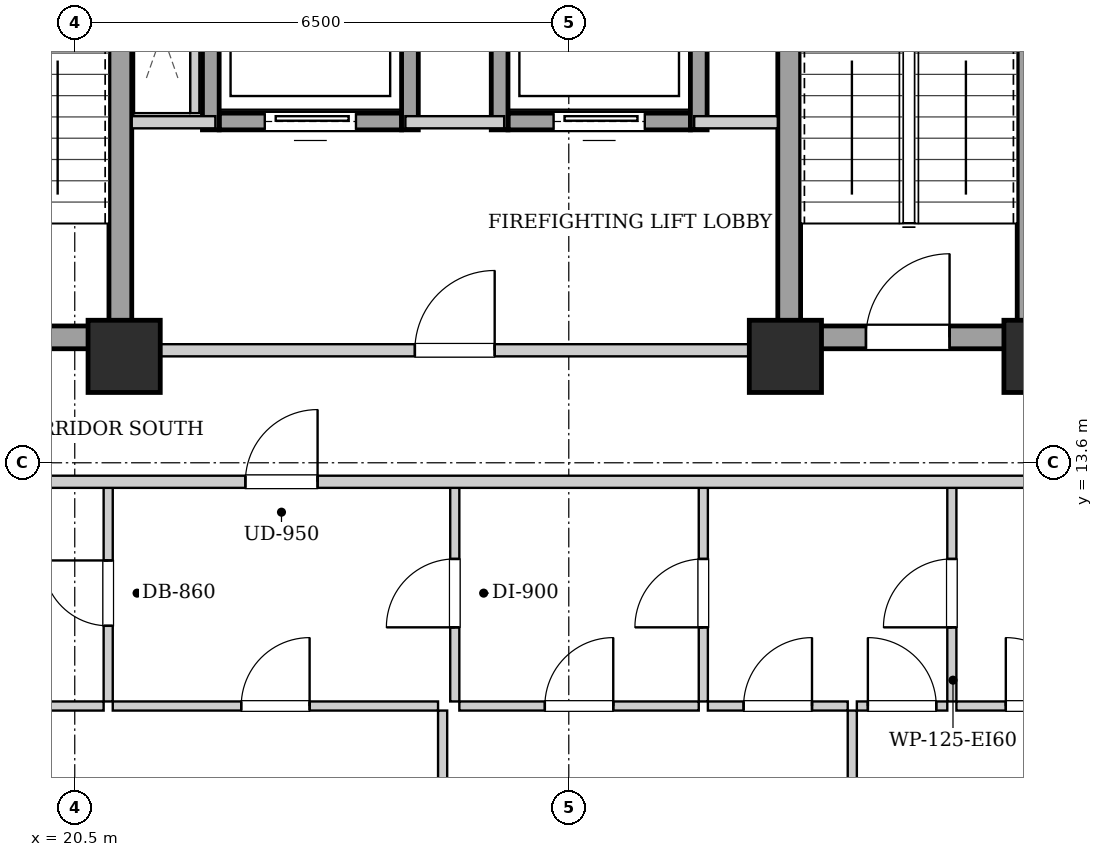
"""IFC4 building model, lengths in metres.
Left out: names, types, materials, properties, quantities, classifications, styles, units other than length and angle.
Written with IfcOpenShell. Run it as: python <this file> out.ifc"""

import sys

from ifc_helpers import new_model, si_unit, direction, frame, frame_2d, origin, origin_2d, place, context, subcontext, project, spatial, rectangle, extrude, element, fill, save


model = new_model("IFC4")
c1 = context("Model", 3, precision=1e-05, world=origin(), true_north=direction((0.0, 1.0)))
c2 = subcontext(c1, "Body", "Model", "MODEL_VIEW")
j1 = project(units=[si_unit("LENGTHUNIT", "METRE"), si_unit("PLANEANGLEUNIT", "RADIAN")], contexts=[c1])
p1 = place(None, origin())
s1 = spatial("IfcSite", under=j1, at=p1, CompositionType="ELEMENT")
p2 = place(p1, origin())
s2 = spatial("IfcBuilding", under=s1, at=p2, CompositionType="ELEMENT")
p3 = place(p2, frame((0.0, 0.0, 166.65)))
s3 = spatial("IfcBuildingStorey", under=s2, at=p3, CompositionType="ELEMENT", Elevation=166.65)
for number, where, z_axis, x_axis in (
    (1, (21.15, 15.0, 0.0), (0.0, 0.0, 1.0), (1.0, 0.0, 0.0)),
    (2, (29.85, 15.0, 0.0), (0.0, 0.0, 1.0), (1.0, 0.0, 0.0)),
    (3, (33.2, 15.0, 0.0), (0.0, 0.0, 1.0), (1.0, 0.0, 0.0)),
):
    element("IfcColumn", number, at=place(p3, frame(where, z_axis=z_axis, x_axis=x_axis)), inside=s3, PredefinedType="COLUMN", context=c2, shape_type="SweptSolid", body=[
        extrude(rectangle(XDim=0.95, YDim=0.95, at=origin_2d()), origin(), (0.0, 0.0, 1.0), 3.25),
    ])
p4 = place(p3, frame((21.1, 15.1, 0.0), z_axis=(0.0, 0.0, 1.0), x_axis=(0.0, 1.0, 0.0)))
e4 = element("IfcWall", 4, at=p4, inside=s3, PredefinedType="SHEAR", context=c2, shape_type="SweptSolid", body=[
    extrude(rectangle(XDim=9.0, YDim=0.3, at=frame_2d((4.5, 0.0))), origin(), (0.0, 0.0, 1.0), 2.93),
])
p5 = place(p3, frame((18.1, 15.25, 0.0), z_axis=(0.0, 0.0, 1.0), x_axis=(1.0, 0.0, 0.0)))
e5 = element("IfcWall", 5, at=p5, inside=s3, PredefinedType="SHEAR", context=c2, shape_type="SweptSolid", body=[
    extrude(rectangle(XDim=2.85, YDim=0.3, at=frame_2d((1.425, 0.0))), origin(), (0.0, 0.0, 1.0), 2.93),
])
p6 = place(p5, frame((0.86, 0.0, 0.0)))
e6 = element("IfcOpeningElement", 6, at=p6, cuts=e5, PredefinedType="OPENING", context=c2, shape_type="SweptSolid", body=[
    extrude(rectangle(XDim=1.1, YDim=2.05, at=frame_2d((0.55, 1.025))), frame((0.0, 0.16, 0.0), z_axis=(0.0, -1.0, 0.0), x_axis=(1.0, 0.0, 0.0)), (0.0, 0.0, 1.0), 0.32),
])
for number, where, z_axis, x_axis in (
    (7, (29.9, 15.1, 0.0), (0.0, 0.0, 1.0), (0.0, 1.0, 0.0)),
    (8, (33.05, 15.1, 0.0), (0.0, 0.0, 1.0), (0.0, 1.0, 0.0)),
):
    element("IfcWall", number, at=place(p3, frame(where, z_axis=z_axis, x_axis=x_axis)), inside=s3, PredefinedType="SHEAR", context=c2, shape_type="SweptSolid", body=[
        extrude(rectangle(XDim=9.0, YDim=0.3, at=frame_2d((4.5, 0.0))), origin(), (0.0, 0.0, 1.0), 2.93),
    ])
p7 = place(p3, frame((30.05, 15.25, 0.0), z_axis=(0.0, 0.0, 1.0), x_axis=(1.0, 0.0, 0.0)))
e9 = element("IfcWall", 9, at=p7, inside=s3, PredefinedType="SHEAR", context=c2, shape_type="SweptSolid", body=[
    extrude(rectangle(XDim=2.85, YDim=0.3, at=frame_2d((1.425, 0.0))), origin(), (0.0, 0.0, 1.0), 2.93),
])
p8 = place(p7, frame((0.86, 0.0, 0.0)))
e10 = element("IfcOpeningElement", 10, at=p8, cuts=e9, PredefinedType="OPENING", context=c2, shape_type="SweptSolid", body=[
    extrude(rectangle(XDim=1.1, YDim=2.05, at=frame_2d((0.55, 1.025))), frame((0.0, 0.16, 0.0), z_axis=(0.0, -1.0, 0.0), x_axis=(1.0, 0.0, 0.0)), (0.0, 0.0, 1.0), 0.32),
])
p9 = place(p3, frame((22.4, 18.09, 0.0), z_axis=(0.0, 0.0, 1.0), x_axis=(1.0, 0.0, 0.0)))
e11 = element("IfcWall", 11, at=p9, inside=s3, PredefinedType="SHEAR", context=c2, shape_type="SweptSolid", body=[
    extrude(rectangle(XDim=2.4, YDim=0.22, at=frame_2d((1.2, 0.0))), origin(), (0.0, 0.0, 1.0), 2.93),
])
p10 = place(p9, frame((0.6, 0.0, 0.0)))
e12 = element("IfcOpeningElement", 12, at=p10, cuts=e11, PredefinedType="OPENING", context=c2, shape_type="SweptSolid", body=[
    extrude(rectangle(XDim=1.2, YDim=2.15, at=frame_2d((0.6, 1.075))), frame((0.0, 0.12, 0.0), z_axis=(0.0, -1.0, 0.0), x_axis=(1.0, 0.0, 0.0)), (0.0, 0.0, 1.0), 0.24),
])
for number, where, z_axis, x_axis in (
    (13, (22.29, 17.98, 0.0), (0.0, 0.0, 1.0), (0.0, 1.0, 0.0)),
    (14, (24.91, 17.98, 0.0), (0.0, 0.0, 1.0), (0.0, 1.0, 0.0)),
):
    element("IfcWall", number, at=place(p3, frame(where, z_axis=z_axis, x_axis=x_axis)), inside=s3, PredefinedType="SHEAR", context=c2, shape_type="SweptSolid", body=[
        extrude(rectangle(XDim=2.54, YDim=0.22, at=frame_2d((1.27, 0.0))), origin(), (0.0, 0.0, 1.0), 2.93),
    ])
p11 = place(p3, frame((26.2, 18.09, 0.0), z_axis=(0.0, 0.0, 1.0), x_axis=(1.0, 0.0, 0.0)))
e15 = element("IfcWall", 15, at=p11, inside=s3, PredefinedType="SHEAR", context=c2, shape_type="SweptSolid", body=[
    extrude(rectangle(XDim=2.4, YDim=0.22, at=frame_2d((1.2, 0.0))), origin(), (0.0, 0.0, 1.0), 2.93),
])
p12 = place(p11, frame((0.6, 0.0, 0.0)))
e16 = element("IfcOpeningElement", 16, at=p12, cuts=e15, PredefinedType="OPENING", context=c2, shape_type="SweptSolid", body=[
    extrude(rectangle(XDim=1.2, YDim=2.15, at=frame_2d((0.6, 1.075))), frame((0.0, 0.12, 0.0), z_axis=(0.0, -1.0, 0.0), x_axis=(1.0, 0.0, 0.0)), (0.0, 0.0, 1.0), 0.24),
])
for number, where, z_axis, x_axis in (
    (17, (26.09, 17.98, 0.0), (0.0, 0.0, 1.0), (0.0, 1.0, 0.0)),
    (18, (28.71, 17.98, 0.0), (0.0, 0.0, 1.0), (0.0, 1.0, 0.0)),
):
    element("IfcWall", number, at=place(p3, frame(where, z_axis=z_axis, x_axis=x_axis)), inside=s3, PredefinedType="SHEAR", context=c2, shape_type="SweptSolid", body=[
        extrude(rectangle(XDim=2.54, YDim=0.22, at=frame_2d((1.27, 0.0))), origin(), (0.0, 0.0, 1.0), 2.93),
    ])
p13 = place(p3, frame((21.25, 15.08, 0.0), z_axis=(0.0, 0.0, 1.0), x_axis=(1.0, 0.0, 0.0)))
e19 = element("IfcWall", 19, at=p13, inside=s3, PredefinedType="PARTITIONING", context=c2, shape_type="SweptSolid", body=[
    extrude(rectangle(XDim=8.5, YDim=0.16, at=frame_2d((4.25, 0.0))), origin(), (0.0, 0.0, 1.0), 2.382),
])
p14 = place(p13, frame((3.725, 0.0, 0.0)))
e20 = element("IfcOpeningElement", 20, at=p14, cuts=e19, PredefinedType="OPENING", context=c2, shape_type="SweptSolid", body=[
    extrude(rectangle(XDim=1.05, YDim=2.05, at=frame_2d((0.525, 1.025))), frame((0.0, 0.09, 0.0), z_axis=(0.0, -1.0, 0.0), x_axis=(1.0, 0.0, 0.0)), (0.0, 0.0, 1.0), 0.18),
])
p15 = place(p3, frame((21.25, 18.08, 0.0), z_axis=(0.0, 0.0, 1.0), x_axis=(1.0, 0.0, 0.0)))
e21 = element("IfcWall", 21, at=p15, inside=s3, PredefinedType="PARTITIONING", context=c2, shape_type="SweptSolid", body=[
    extrude(rectangle(XDim=1.1, YDim=0.16, at=frame_2d((0.55, 0.0))), origin(), (0.0, 0.0, 1.0), 2.93),
])
p16 = place(p3, frame((24.85, 18.08, 0.0), z_axis=(0.0, 0.0, 1.0), x_axis=(1.0, 0.0, 0.0)))
e22 = element("IfcWall", 22, at=p16, inside=s3, PredefinedType="PARTITIONING", context=c2, shape_type="SweptSolid", body=[
    extrude(rectangle(XDim=1.3, YDim=0.16, at=frame_2d((0.65, 0.0))), origin(), (0.0, 0.0, 1.0), 2.93),
])
p17 = place(p3, frame((28.65, 18.08, 0.0), z_axis=(0.0, 0.0, 1.0), x_axis=(1.0, 0.0, 0.0)))
e23 = element("IfcWall", 23, at=p17, inside=s3, PredefinedType="PARTITIONING", context=c2, shape_type="SweptSolid", body=[
    extrude(rectangle(XDim=1.1, YDim=0.16, at=frame_2d((0.55, 0.0))), origin(), (0.0, 0.0, 1.0), 2.93),
])
p18 = place(p3, frame((22.08, 18.2, 0.0), z_axis=(0.0, 0.0, 1.0), x_axis=(0.0, 1.0, 0.0)))
e24 = element("IfcWall", 24, at=p18, inside=s3, PredefinedType="PARTITIONING", context=c2, shape_type="SweptSolid", body=[
    extrude(rectangle(XDim=2.12, YDim=0.12, at=frame_2d((1.06, 0.0))), origin(), (0.0, 0.0, 1.0), 2.93),
])
p19 = place(p3, frame((20.94, 10.46, 0.0), z_axis=(0.0, 0.0, 1.0), x_axis=(0.0, 1.0, 0.0)))
e25 = element("IfcWall", 25, at=p19, inside=s3, PredefinedType="PARTITIONING", context=c2, shape_type="SweptSolid", body=[
    extrude(rectangle(XDim=2.85, YDim=0.12, at=frame_2d((1.425, 0.0))), origin(), (0.0, 0.0, 1.0), 2.93),
])
p20 = place(p19, frame((0.995, 0.0, 0.0)))
e26 = element("IfcOpeningElement", 26, at=p20, cuts=e25, PredefinedType="OPENING", context=c2, shape_type="SweptSolid", body=[
    extrude(rectangle(XDim=0.86, YDim=2.05, at=frame_2d((0.43, 1.025))), frame((0.0, 0.07, 0.0), z_axis=(0.0, -1.0, 0.0), x_axis=(1.0, 0.0, 0.0)), (0.0, 0.0, 1.0), 0.14),
])
p21 = place(p3, frame((18.48, 10.4, 0.0), z_axis=(0.0, 0.0, 1.0), x_axis=(1.0, 0.0, 0.0)))
e27 = element("IfcWall", 27, at=p21, inside=s3, PredefinedType="PARTITIONING", context=c2, shape_type="SweptSolid", body=[
    extrude(rectangle(XDim=2.4, YDim=0.12, at=frame_2d((1.2, 0.0))), origin(), (0.0, 0.0, 1.0), 2.93),
])
p22 = place(p3, frame((25.5, 10.46, 0.0), z_axis=(0.0, 0.0, 1.0), x_axis=(0.0, 1.0, 0.0)))
e28 = element("IfcWall", 28, at=p22, inside=s3, PredefinedType="PARTITIONING", context=c2, shape_type="SweptSolid", body=[
    extrude(rectangle(XDim=2.85, YDim=0.12, at=frame_2d((1.425, 0.0))), origin(), (0.0, 0.0, 1.0), 2.93),
])
p23 = place(p22, frame((0.975, 0.0, 0.0)))
e29 = element("IfcOpeningElement", 29, at=p23, cuts=e28, PredefinedType="OPENING", context=c2, shape_type="SweptSolid", body=[
    extrude(rectangle(XDim=0.9, YDim=2.05, at=frame_2d((0.45, 1.025))), frame((0.0, 0.07, 0.0), z_axis=(0.0, -1.0, 0.0), x_axis=(1.0, 0.0, 0.0)), (0.0, 0.0, 1.0), 0.14),
])
p24 = place(p3, frame((21.0, 10.4, 0.0), z_axis=(0.0, 0.0, 1.0), x_axis=(1.0, 0.0, 0.0)))
e30 = element("IfcWall", 30, at=p24, inside=s3, PredefinedType="PARTITIONING", context=c2, shape_type="SweptSolid", body=[
    extrude(rectangle(XDim=4.28, YDim=0.12, at=frame_2d((2.14, 0.0))), origin(), (0.0, 0.0, 1.0), 2.93),
])
p25 = place(p24, frame((1.69, 0.0, 0.0)))
e31 = element("IfcOpeningElement", 31, at=p25, cuts=e30, PredefinedType="OPENING", context=c2, shape_type="SweptSolid", body=[
    extrude(rectangle(XDim=0.9, YDim=2.05, at=frame_2d((0.45, 1.025))), frame((0.0, 0.07, 0.0), z_axis=(0.0, -1.0, 0.0), x_axis=(1.0, 0.0, 0.0)), (0.0, 0.0, 1.0), 0.14),
])
p26 = place(p3, frame((28.77, 10.46, 0.0), z_axis=(0.0, 0.0, 1.0), x_axis=(0.0, 1.0, 0.0)))
e32 = element("IfcWall", 32, at=p26, inside=s3, PredefinedType="PARTITIONING", context=c2, shape_type="SweptSolid", body=[
    extrude(rectangle(XDim=2.85, YDim=0.12, at=frame_2d((1.425, 0.0))), origin(), (0.0, 0.0, 1.0), 2.93),
])
p27 = place(p26, frame((0.975, 0.0, 0.0)))
e33 = element("IfcOpeningElement", 33, at=p27, cuts=e32, PredefinedType="OPENING", context=c2, shape_type="SweptSolid", body=[
    extrude(rectangle(XDim=0.9, YDim=2.05, at=frame_2d((0.45, 1.025))), frame((0.0, 0.07, 0.0), z_axis=(0.0, -1.0, 0.0), x_axis=(1.0, 0.0, 0.0)), (0.0, 0.0, 1.0), 0.14),
])
p28 = place(p3, frame((25.56, 10.4, 0.0), z_axis=(0.0, 0.0, 1.0), x_axis=(1.0, 0.0, 0.0)))
e34 = element("IfcWall", 34, at=p28, inside=s3, PredefinedType="PARTITIONING", context=c2, shape_type="SweptSolid", body=[
    extrude(rectangle(XDim=3.15, YDim=0.12, at=frame_2d((1.575, 0.0))), origin(), (0.0, 0.0, 1.0), 2.93),
])
p29 = place(p28, frame((1.125, 0.0, 0.0)))
e35 = element("IfcOpeningElement", 35, at=p29, cuts=e34, PredefinedType="OPENING", context=c2, shape_type="SweptSolid", body=[
    extrude(rectangle(XDim=0.9, YDim=2.05, at=frame_2d((0.45, 1.025))), frame((0.0, 0.07, 0.0), z_axis=(0.0, -1.0, 0.0), x_axis=(1.0, 0.0, 0.0)), (0.0, 0.0, 1.0), 0.14),
])
p30 = place(p3, frame((32.04, 10.46, 0.0), z_axis=(0.0, 0.0, 1.0), x_axis=(0.0, 1.0, 0.0)))
e36 = element("IfcWall", 36, at=p30, inside=s3, PredefinedType="PARTITIONING", context=c2, shape_type="SweptSolid", body=[
    extrude(rectangle(XDim=2.85, YDim=0.12, at=frame_2d((1.425, 0.0))), origin(), (0.0, 0.0, 1.0), 2.93),
])
p31 = place(p30, frame((0.975, 0.0, 0.0)))
e37 = element("IfcOpeningElement", 37, at=p31, cuts=e36, PredefinedType="OPENING", context=c2, shape_type="SweptSolid", body=[
    extrude(rectangle(XDim=0.9, YDim=2.05, at=frame_2d((0.45, 1.025))), frame((0.0, 0.07, 0.0), z_axis=(0.0, -1.0, 0.0), x_axis=(1.0, 0.0, 0.0)), (0.0, 0.0, 1.0), 0.14),
])
p32 = place(p3, frame((28.83, 10.4, 0.0), z_axis=(0.0, 0.0, 1.0), x_axis=(1.0, 0.0, 0.0)))
e38 = element("IfcWall", 38, at=p32, inside=s3, PredefinedType="PARTITIONING", context=c2, shape_type="SweptSolid", body=[
    extrude(rectangle(XDim=1.84, YDim=0.12, at=frame_2d((0.92, 0.0))), origin(), (0.0, 0.0, 1.0), 2.93),
])
p33 = place(p32, frame((0.47, 0.0, 0.0)))
e39 = element("IfcOpeningElement", 39, at=p33, cuts=e38, PredefinedType="OPENING", context=c2, shape_type="SweptSolid", body=[
    extrude(rectangle(XDim=0.9, YDim=2.05, at=frame_2d((0.45, 1.025))), frame((0.0, 0.07, 0.0), z_axis=(0.0, -1.0, 0.0), x_axis=(1.0, 0.0, 0.0)), (0.0, 0.0, 1.0), 0.14),
])
p34 = place(p3, frame((30.79, 10.4, 0.0), z_axis=(0.0, 0.0, 1.0), x_axis=(1.0, 0.0, 0.0)))
e40 = element("IfcWall", 40, at=p34, inside=s3, PredefinedType="PARTITIONING", context=c2, shape_type="SweptSolid", body=[
    extrude(rectangle(XDim=1.19, YDim=0.12, at=frame_2d((0.595, 0.0))), origin(), (0.0, 0.0, 1.0), 2.93),
])
p35 = place(p34, frame((0.145, 0.0, 0.0)))
e41 = element("IfcOpeningElement", 41, at=p35, cuts=e40, PredefinedType="OPENING", context=c2, shape_type="SweptSolid", body=[
    extrude(rectangle(XDim=0.9, YDim=2.05, at=frame_2d((0.45, 1.025))), frame((0.0, 0.07, 0.0), z_axis=(0.0, -1.0, 0.0), x_axis=(1.0, 0.0, 0.0)), (0.0, 0.0, 1.0), 0.14),
])
p36 = place(p3, frame((32.1, 10.4, 0.0), z_axis=(0.0, 0.0, 1.0), x_axis=(1.0, 0.0, 0.0)))
e42 = element("IfcWall", 42, at=p36, inside=s3, PredefinedType="PARTITIONING", context=c2, shape_type="SweptSolid", body=[
    extrude(rectangle(XDim=2.2, YDim=0.12, at=frame_2d((1.1, 0.0))), origin(), (0.0, 0.0, 1.0), 2.93),
])
p37 = place(p36, frame((0.65, 0.0, 0.0)))
e43 = element("IfcOpeningElement", 43, at=p37, cuts=e42, PredefinedType="OPENING", context=c2, shape_type="SweptSolid", body=[
    extrude(rectangle(XDim=0.9, YDim=2.05, at=frame_2d((0.45, 1.025))), frame((0.0, 0.07, 0.0), z_axis=(0.0, -1.0, 0.0), x_axis=(1.0, 0.0, 0.0)), (0.0, 0.0, 1.0), 0.14),
])
p38 = place(p3, frame((25.34, 4.08, 0.0), z_axis=(0.0, 0.0, 1.0), x_axis=(0.0, 1.0, 0.0)))
e44 = element("IfcWall", 44, at=p38, inside=s3, PredefinedType="PARTITIONING", context=c2, shape_type="SweptSolid", body=[
    extrude(rectangle(XDim=6.26, YDim=0.12, at=frame_2d((3.13, 0.0))), origin(), (0.0, 0.0, 1.0), 2.93),
])
p39 = place(p38, frame((2.665, 0.0, 0.0)))
e45 = element("IfcOpeningElement", 45, at=p39, cuts=e44, PredefinedType="OPENING", context=c2, shape_type="SweptSolid", body=[
    extrude(rectangle(XDim=0.9, YDim=2.05, at=frame_2d((0.45, 1.025))), frame((0.0, 0.07, 0.0), z_axis=(0.0, -1.0, 0.0), x_axis=(1.0, 0.0, 0.0)), (0.0, 0.0, 1.0), 0.14),
])
p40 = place(p3, frame((30.73, 4.08, 0.0), z_axis=(0.0, 0.0, 1.0), x_axis=(0.0, 1.0, 0.0)))
e46 = element("IfcWall", 46, at=p40, inside=s3, PredefinedType="PARTITIONING", context=c2, shape_type="SweptSolid", body=[
    extrude(rectangle(XDim=6.26, YDim=0.12, at=frame_2d((3.13, 0.0))), origin(), (0.0, 0.0, 1.0), 2.93),
])
p41 = place(p40, frame((2.665, 0.0, 0.0)))
e47 = element("IfcOpeningElement", 47, at=p41, cuts=e46, PredefinedType="OPENING", context=c2, shape_type="SweptSolid", body=[
    extrude(rectangle(XDim=0.9, YDim=2.05, at=frame_2d((0.45, 1.025))), frame((0.0, 0.07, 0.0), z_axis=(0.0, -1.0, 0.0), x_axis=(1.0, 0.0, 0.0)), (0.0, 0.0, 1.0), 0.14),
])
p42 = place(p3, frame((10.05, 13.35, 0.0), z_axis=(0.0, 0.0, 1.0), x_axis=(1.0, 0.0, 0.0)))
e48 = element("IfcWall", 48, at=p42, inside=s3, PredefinedType="PARTITIONING", context=c2, shape_type="SweptSolid", body=[
    extrude(rectangle(XDim=27.7, YDim=0.16, at=frame_2d((13.85, 0.0))), origin(), (0.0, 0.0, 1.0), 2.93),
])
p43 = place(p42, frame((3.8, 0.0, 0.0)))
e49 = element("IfcOpeningElement", 49, at=p43, cuts=e48, PredefinedType="OPENING", context=c2, shape_type="SweptSolid", body=[
    extrude(rectangle(XDim=0.95, YDim=2.1, at=frame_2d((0.475, 1.05))), frame((0.0, 0.09, 0.0), z_axis=(0.0, -1.0, 0.0), x_axis=(1.0, 0.0, 0.0)), (0.0, 0.0, 1.0), 0.18),
])
p44 = place(p42, frame((12.695, 0.0, 0.0)))
e50 = element("IfcOpeningElement", 50, at=p44, cuts=e48, PredefinedType="OPENING", context=c2, shape_type="SweptSolid", body=[
    extrude(rectangle(XDim=0.95, YDim=2.1, at=frame_2d((0.475, 1.05))), frame((0.0, 0.09, 0.0), z_axis=(0.0, -1.0, 0.0), x_axis=(1.0, 0.0, 0.0)), (0.0, 0.0, 1.0), 0.18),
])
p45 = place(p8, origin())
e51 = element("IfcDoor", 51, at=p45, inside=s3, OperationType="SINGLE_SWING_RIGHT", PredefinedType="DOOR", context=c2, shape_type="SweptSolid", body=[
    extrude(rectangle(XDim=1.1, YDim=2.05, at=frame_2d((0.55, 1.025))), frame((0.0, 0.025, 0.0), z_axis=(0.0, -1.0, 0.0), x_axis=(1.0, 0.0, 0.0)), (0.0, 0.0, 1.0), 0.05),
])
fill(e10, e51)
p46 = place(p10, origin())
e52 = element("IfcDoor", 52, at=p46, inside=s3, OperationType="SLIDING_TO_LEFT", PredefinedType="DOOR", context=c2, shape_type="SweptSolid", body=[
    extrude(rectangle(XDim=1.2, YDim=2.15, at=frame_2d((0.6, 1.075))), frame((0.0, 0.025, 0.0), z_axis=(0.0, -1.0, 0.0), x_axis=(1.0, 0.0, 0.0)), (0.0, 0.0, 1.0), 0.05),
])
fill(e12, e52)
p47 = place(p12, origin())
e53 = element("IfcDoor", 53, at=p47, inside=s3, OperationType="SLIDING_TO_LEFT", PredefinedType="DOOR", context=c2, shape_type="SweptSolid", body=[
    extrude(rectangle(XDim=1.2, YDim=2.15, at=frame_2d((0.6, 1.075))), frame((0.0, 0.025, 0.0), z_axis=(0.0, -1.0, 0.0), x_axis=(1.0, 0.0, 0.0)), (0.0, 0.0, 1.0), 0.05),
])
fill(e16, e53)
p48 = place(p14, origin())
e54 = element("IfcDoor", 54, at=p48, inside=s3, OperationType="SINGLE_SWING_RIGHT", PredefinedType="DOOR", context=c2, shape_type="SweptSolid", body=[
    extrude(rectangle(XDim=1.05, YDim=2.05, at=frame_2d((0.525, 1.025))), frame((0.0, 0.025, 0.0), z_axis=(0.0, -1.0, 0.0), x_axis=(1.0, 0.0, 0.0)), (0.0, 0.0, 1.0), 0.05),
])
fill(e20, e54)
p49 = place(p20, origin())
e55 = element("IfcDoor", 55, at=p49, inside=s3, OperationType="SINGLE_SWING_RIGHT", PredefinedType="DOOR", context=c2, shape_type="SweptSolid", body=[
    extrude(rectangle(XDim=0.86, YDim=2.05, at=frame_2d((0.43, 1.025))), frame((0.0, 0.025, 0.0), z_axis=(0.0, -1.0, 0.0), x_axis=(1.0, 0.0, 0.0)), (0.0, 0.0, 1.0), 0.05),
])
fill(e26, e55)
p50 = place(p23, origin())
e56 = element("IfcDoor", 56, at=p50, inside=s3, OperationType="SINGLE_SWING_LEFT", PredefinedType="DOOR", context=c2, shape_type="SweptSolid", body=[
    extrude(rectangle(XDim=0.9, YDim=2.05, at=frame_2d((0.45, 1.025))), frame((0.0, 0.025, 0.0), z_axis=(0.0, -1.0, 0.0), x_axis=(1.0, 0.0, 0.0)), (0.0, 0.0, 1.0), 0.05),
])
fill(e29, e56)
p51 = place(p25, origin())
e57 = element("IfcDoor", 57, at=p51, inside=s3, OperationType="SINGLE_SWING_RIGHT", PredefinedType="DOOR", context=c2, shape_type="SweptSolid", body=[
    extrude(rectangle(XDim=0.9, YDim=2.05, at=frame_2d((0.45, 1.025))), frame((0.0, 0.025, 0.0), z_axis=(0.0, -1.0, 0.0), x_axis=(1.0, 0.0, 0.0)), (0.0, 0.0, 1.0), 0.05),
])
fill(e31, e57)
p52 = place(p27, origin())
e58 = element("IfcDoor", 58, at=p52, inside=s3, OperationType="SINGLE_SWING_LEFT", PredefinedType="DOOR", context=c2, shape_type="SweptSolid", body=[
    extrude(rectangle(XDim=0.9, YDim=2.05, at=frame_2d((0.45, 1.025))), frame((0.0, 0.025, 0.0), z_axis=(0.0, -1.0, 0.0), x_axis=(1.0, 0.0, 0.0)), (0.0, 0.0, 1.0), 0.05),
])
fill(e33, e58)
p53 = place(p29, origin())
e59 = element("IfcDoor", 59, at=p53, inside=s3, OperationType="SINGLE_SWING_RIGHT", PredefinedType="DOOR", context=c2, shape_type="SweptSolid", body=[
    extrude(rectangle(XDim=0.9, YDim=2.05, at=frame_2d((0.45, 1.025))), frame((0.0, 0.025, 0.0), z_axis=(0.0, -1.0, 0.0), x_axis=(1.0, 0.0, 0.0)), (0.0, 0.0, 1.0), 0.05),
])
fill(e35, e59)
p54 = place(p31, origin())
e60 = element("IfcDoor", 60, at=p54, inside=s3, OperationType="SINGLE_SWING_LEFT", PredefinedType="DOOR", context=c2, shape_type="SweptSolid", body=[
    extrude(rectangle(XDim=0.9, YDim=2.05, at=frame_2d((0.45, 1.025))), frame((0.0, 0.025, 0.0), z_axis=(0.0, -1.0, 0.0), x_axis=(1.0, 0.0, 0.0)), (0.0, 0.0, 1.0), 0.05),
])
fill(e37, e60)
p55 = place(p33, origin())
e61 = element("IfcDoor", 61, at=p55, inside=s3, OperationType="SINGLE_SWING_RIGHT", PredefinedType="DOOR", context=c2, shape_type="SweptSolid", body=[
    extrude(rectangle(XDim=0.9, YDim=2.05, at=frame_2d((0.45, 1.025))), frame((0.0, 0.025, 0.0), z_axis=(0.0, -1.0, 0.0), x_axis=(1.0, 0.0, 0.0)), (0.0, 0.0, 1.0), 0.05),
])
fill(e39, e61)
p56 = place(p35, origin())
e62 = element("IfcDoor", 62, at=p56, inside=s3, OperationType="SINGLE_SWING_LEFT", PredefinedType="DOOR", context=c2, shape_type="SweptSolid", body=[
    extrude(rectangle(XDim=0.9, YDim=2.05, at=frame_2d((0.45, 1.025))), frame((0.0, 0.025, 0.0), z_axis=(0.0, -1.0, 0.0), x_axis=(1.0, 0.0, 0.0)), (0.0, 0.0, 1.0), 0.05),
])
fill(e41, e62)
p57 = place(p37, origin())
e63 = element("IfcDoor", 63, at=p57, inside=s3, OperationType="SINGLE_SWING_LEFT", PredefinedType="DOOR", context=c2, shape_type="SweptSolid", body=[
    extrude(rectangle(XDim=0.9, YDim=2.05, at=frame_2d((0.45, 1.025))), frame((0.0, 0.025, 0.0), z_axis=(0.0, -1.0, 0.0), x_axis=(1.0, 0.0, 0.0)), (0.0, 0.0, 1.0), 0.05),
])
fill(e43, e63)
p58 = place(p44, origin())
e64 = element("IfcDoor", 64, at=p58, inside=s3, OperationType="SINGLE_SWING_RIGHT", PredefinedType="DOOR", context=c2, shape_type="SweptSolid", body=[
    extrude(rectangle(XDim=0.95, YDim=2.1, at=frame_2d((0.475, 1.05))), frame((0.0, 0.025, 0.0), z_axis=(0.0, -1.0, 0.0), x_axis=(1.0, 0.0, 0.0)), (0.0, 0.0, 1.0), 0.05),
])
fill(e50, e64)
save(model, sys.argv[1])
